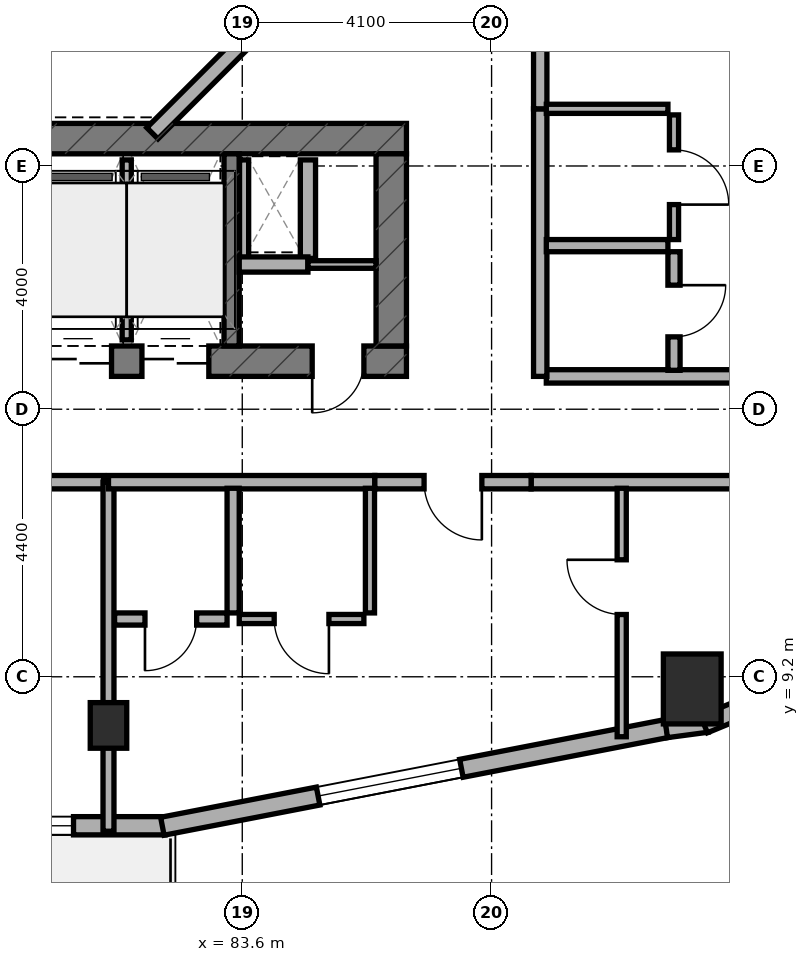
"""IFC4 building model, lengths in metres.
Left out: names, types, materials, properties, quantities, classifications, styles, units other than length and angle.
Written with IfcOpenShell. Run it as: python <this file> out.ifc"""

import sys

from ifc_helpers import new_model, si_unit, direction, frame, frame_2d, origin, origin_2d, place, context, subcontext, project, spatial, rectangle, extrude, element, fill, save


model = new_model("IFC4")
c1 = context("Model", 3, precision=1e-05, world=origin(), true_north=direction((0.0, 1.0)))
c2 = subcontext(c1, "Body", "Model", "MODEL_VIEW")
j1 = project(units=[si_unit("LENGTHUNIT", "METRE"), si_unit("PLANEANGLEUNIT", "RADIAN")], contexts=[c1])
p1 = place(None, origin())
s1 = spatial("IfcSite", under=j1, at=p1, CompositionType="ELEMENT")
p2 = place(p1, origin())
s2 = spatial("IfcBuilding", under=s1, at=p2, CompositionType="ELEMENT")
p3 = place(p2, frame((0.0, 0.0, 80.0)))
s3 = spatial("IfcBuildingStorey", under=s2, at=p3, CompositionType="ELEMENT", Elevation=80.0)
p4 = place(p3, frame((67.9, 14.39, 0.0), z_axis=(0.0, 0.0, 1.0), x_axis=(1.0, 0.0, 0.0)))
e1 = element("IfcWall", 1, at=p4, inside=s3, PredefinedType="SHEAR", context=c2, shape_type="SweptSolid", body=[
    extrude(rectangle(XDim=18.4, YDim=0.5, at=frame_2d((9.2, 0.0))), origin(), (0.0, 0.0, 1.0), 3.5),
])
p5 = place(p4, frame((9.25, 0.0, 0.0)))
e2 = element("IfcOpeningElement", 2, at=p5, cuts=e1, PredefinedType="OPENING", context=c2, shape_type="SweptSolid", body=[
    extrude(rectangle(XDim=1.2, YDim=2.15, at=frame_2d((0.6, 1.075))), frame((0.0, 0.26, 0.0), z_axis=(0.0, -1.0, 0.0), x_axis=(1.0, 0.0, 0.0)), (0.0, 0.0, 1.0), 0.52),
])
p6 = place(p4, frame((16.85, 0.0, 0.0)))
e3 = element("IfcOpeningElement", 3, at=p6, cuts=e1, PredefinedType="OPENING", context=c2, shape_type="SweptSolid", body=[
    extrude(rectangle(XDim=0.85, YDim=2.1, at=frame_2d((0.425, 1.05))), frame((0.0, 0.26, 0.0), z_axis=(0.0, -1.0, 0.0), x_axis=(1.0, 0.0, 0.0)), (0.0, 0.0, 1.0), 0.52),
])
p7 = place(p4, frame((12.45, 0.0, 0.0)))
e4 = element("IfcOpeningElement", 4, at=p7, cuts=e1, PredefinedType="OPENING", context=c2, shape_type="SweptSolid", body=[
    extrude(rectangle(XDim=1.1, YDim=2.15, at=frame_2d((0.55, 1.075))), frame((0.0, 0.26, 0.0), z_axis=(0.0, -1.0, 0.0), x_axis=(1.0, 0.0, 0.0)), (0.0, 0.0, 1.0), 0.52),
])
p8 = place(p4, frame((14.05, 0.0, 0.0)))
e5 = element("IfcOpeningElement", 5, at=p8, cuts=e1, PredefinedType="OPENING", context=c2, shape_type="SweptSolid", body=[
    extrude(rectangle(XDim=1.1, YDim=2.15, at=frame_2d((0.55, 1.075))), frame((0.0, 0.26, 0.0), z_axis=(0.0, -1.0, 0.0), x_axis=(1.0, 0.0, 0.0)), (0.0, 0.0, 1.0), 0.52),
])
p9 = place(p3, frame((67.9, 18.05, 0.0), z_axis=(0.0, 0.0, 1.0), x_axis=(1.0, 0.0, 0.0)))
e6 = element("IfcWall", 6, at=p9, inside=s3, PredefinedType="SHEAR", context=c2, shape_type="SweptSolid", body=[
    extrude(rectangle(XDim=18.4, YDim=0.5, at=frame_2d((9.2, 0.0))), origin(), (0.0, 0.0, 1.0), 3.5),
])
p10 = place(p3, frame((86.05, 14.64, 0.0), z_axis=(0.0, 0.0, 1.0), x_axis=(0.0, 1.0, 0.0)))
e7 = element("IfcWall", 7, at=p10, inside=s3, PredefinedType="SHEAR", context=c2, shape_type="SweptSolid", body=[
    extrude(rectangle(XDim=3.16, YDim=0.5, at=frame_2d((1.58, 0.0))), origin(), (0.0, 0.0, 1.0), 3.5),
])
p11 = place(p3, frame((83.425, 14.64, 0.0), z_axis=(0.0, 0.0, 1.0), x_axis=(0.0, 1.0, 0.0)))
e8 = element("IfcWall", 8, at=p11, inside=s3, PredefinedType="STANDARD", context=c2, shape_type="SweptSolid", body=[
    extrude(rectangle(XDim=3.16, YDim=0.25, at=frame_2d((1.58, 0.0))), origin(), (0.0, 0.0, 1.0), 3.25),
])
p12 = place(p3, frame((81.4, 8.4, 0.0), z_axis=(0.0, 0.0, 1.0), x_axis=(1.0, 0.0, 0.0)))
e9 = element("IfcColumn", 9, at=p12, inside=s3, PredefinedType="COLUMN", context=c2, shape_type="SweptSolid", body=[
    extrude(rectangle(XDim=0.6, YDim=0.75, at=origin_2d()), origin(), (0.0, 0.0, 1.0), 3.5),
])
p13 = place(p3, frame((91.0, 9.0, 0.0), z_axis=(0.0, 0.0, 1.0), x_axis=(1.0, 0.0, 0.0)))
e10 = element("IfcColumn", 10, at=p13, inside=s3, PredefinedType="COLUMN", context=c2, shape_type="SweptSolid", body=[
    extrude(rectangle(XDim=0.95, YDim=1.15, at=origin_2d()), origin(), (0.0, 0.0, 1.0), 3.5),
])
p14 = place(p3, frame((71.635, 6.75, 0.0), z_axis=(0.0, 0.0, 1.0), x_axis=(1.0, 0.0, 0.0)))
e11 = element("IfcWall", 11, at=p14, inside=s3, PredefinedType="STANDARD", context=c2, shape_type="SweptSolid", body=[
    extrude(rectangle(XDim=10.695, YDim=0.3, at=frame_2d((5.348, 0.0))), origin(), (0.0, 0.0, 1.0), 3.25),
])
p15 = place(p14, frame((4.665, 0.0, 0.0)))
e12 = element("IfcOpeningElement", 12, at=p15, cuts=e11, PredefinedType="OPENING", context=c2, shape_type="SweptSolid", body=[
    extrude(rectangle(XDim=1.4, YDim=2.15, at=frame_2d((0.7, 1.075))), frame((0.0, 0.16, 0.0), z_axis=(0.0, -1.0, 0.0), x_axis=(1.0, 0.0, 0.0)), (0.0, 0.0, 1.0), 0.32),
])
p16 = place(p14, frame((1.54, 0.0, 0.8)))
e13 = element("IfcOpeningElement", 13, at=p16, cuts=e11, PredefinedType="OPENING", context=c2, shape_type="SweptSolid", body=[
    extrude(rectangle(XDim=2.4, YDim=1.6, at=frame_2d((1.2, 0.8))), frame((0.0, 0.16, 0.0), z_axis=(0.0, -1.0, 0.0), x_axis=(1.0, 0.0, 0.0)), (0.0, 0.0, 1.0), 0.32),
])
p17 = place(p14, frame((6.79, 0.0, 0.8)))
e14 = element("IfcOpeningElement", 14, at=p17, cuts=e11, PredefinedType="OPENING", context=c2, shape_type="SweptSolid", body=[
    extrude(rectangle(XDim=2.4, YDim=1.6, at=frame_2d((1.2, 0.8))), frame((0.0, 0.16, 0.0), z_axis=(0.0, -1.0, 0.0), x_axis=(1.0, 0.0, 0.0)), (0.0, 0.0, 1.0), 0.32),
])
p18 = place(p3, frame((82.286, 6.742, 0.0), z_axis=(0.0, 0.0, 1.0), x_axis=(0.981734775858, 0.190254644808, 0.0)))
e15 = element("IfcWall", 15, at=p18, inside=s3, PredefinedType="STANDARD", context=c2, shape_type="SweptSolid", body=[
    extrude(rectangle(XDim=8.448, YDim=0.3, at=frame_2d((4.224, 0.0))), origin(), (0.0, 0.0, 1.0), 3.25),
])
p19 = place(p18, frame((2.609, 0.0, 0.8)))
e16 = element("IfcOpeningElement", 16, at=p19, cuts=e15, PredefinedType="OPENING", context=c2, shape_type="SweptSolid", body=[
    extrude(rectangle(XDim=2.4, YDim=1.6, at=frame_2d((1.2, 0.8))), frame((0.0, 0.16, 0.0), z_axis=(0.0, -1.0, 0.0), x_axis=(1.0, 0.0, 0.0)), (0.0, 0.0, 1.0), 0.32),
])
p20 = place(p3, frame((90.572, 8.348, 0.0), z_axis=(0.0, 0.0, 1.0), x_axis=(0.991293937098, 0.131667498923, 0.0)))
e17 = element("IfcWall", 17, at=p20, inside=s3, PredefinedType="STANDARD", context=c2, shape_type="SweptSolid", body=[
    extrude(rectangle(XDim=0.677, YDim=0.3, at=frame_2d((0.338, 0.0))), origin(), (0.0, 0.0, 1.0), 3.25),
])
p21 = place(p3, frame((91.193, 8.418, 0.0), z_axis=(0.0, 0.0, 1.0), x_axis=(0.924042561464, 0.382289608286, 0.0)))
e18 = element("IfcWall", 18, at=p21, inside=s3, PredefinedType="STANDARD", context=c2, shape_type="SweptSolid", body=[
    extrude(rectangle(XDim=0.694, YDim=0.3, at=frame_2d((0.347, 0.0))), origin(), (0.0, 0.0, 1.0), 3.25),
])
p22 = place(p3, frame((82.122, 18.138, 0.0), z_axis=(0.0, 0.0, 1.0), x_axis=(0.707106781187, 0.707106781187, 0.0)))
e19 = element("IfcWall", 19, at=p22, inside=s3, PredefinedType="STANDARD", context=c2, shape_type="SweptSolid", body=[
    extrude(rectangle(XDim=2.311, YDim=0.26, at=frame_2d((1.155, 0.0))), origin(), (0.0, 0.0, 1.0), 3.25),
])
p23 = place(p3, frame((83.63, 16.08, 0.0), z_axis=(0.0, 0.0, 1.0), x_axis=(0.0, 1.0, 0.0)))
e20 = element("IfcWall", 20, at=p23, inside=s3, PredefinedType="PARTITIONING", context=c2, shape_type="SweptSolid", body=[
    extrude(rectangle(XDim=1.62, YDim=0.15, at=frame_2d((0.81, 0.0))), origin(), (0.0, 0.0, 1.0), 2.825),
])
p24 = place(p3, frame((84.68, 16.08, 0.0), z_axis=(0.0, 0.0, 1.0), x_axis=(0.0, 1.0, 0.0)))
e21 = element("IfcWall", 21, at=p24, inside=s3, PredefinedType="SOLIDWALL", context=c2, shape_type="SweptSolid", body=[
    extrude(rectangle(XDim=1.62, YDim=0.25, at=frame_2d((0.81, 0.0))), origin(), (0.0, 0.0, 1.0), 3.22),
])
p25 = place(p3, frame((83.55, 15.98, 0.0), z_axis=(0.0, 0.0, 1.0), x_axis=(1.0, 0.0, 0.0)))
e22 = element("IfcWall", 22, at=p25, inside=s3, PredefinedType="SOLIDWALL", context=c2, shape_type="SweptSolid", body=[
    extrude(rectangle(XDim=1.13, YDim=0.25, at=frame_2d((0.565, 0.0))), origin(), (0.0, 0.0, 1.0), 3.22),
])
p26 = place(p3, frame((84.68, 15.98, 0.0), z_axis=(0.0, 0.0, 1.0), x_axis=(1.0, 0.0, 0.0)))
e23 = element("IfcWall", 23, at=p26, inside=s3, PredefinedType="PARTITIONING", context=c2, shape_type="SweptSolid", body=[
    extrude(rectangle(XDim=1.12, YDim=0.125, at=frame_2d((0.56, 0.0))), origin(), (0.0, 0.0, 1.0), 3.22),
])
p27 = place(p3, frame((81.7, 14.74, 0.0), z_axis=(0.0, 0.0, 1.0), x_axis=(0.0, 1.0, 0.0)))
e24 = element("IfcWall", 24, at=p27, inside=s3, PredefinedType="PARTITIONING", context=c2, shape_type="SweptSolid", body=[
    extrude(rectangle(XDim=2.96, YDim=0.15, at=frame_2d((1.48, 0.0))), origin(), (0.0, 0.0, 1.0), 3.22),
])
p28 = place(p3, frame((76.98, 12.4, 0.0), z_axis=(0.0, 0.0, 1.0), x_axis=(1.0, 0.0, 0.0)))
e25 = element("IfcWall", 25, at=p28, inside=s3, PredefinedType="SOLIDWALL", context=c2, shape_type="SweptSolid", body=[
    extrude(rectangle(XDim=4.34, YDim=0.22, at=frame_2d((2.17, 0.0))), origin(), (0.0, 0.0, 1.0), 2.825),
])
p29 = place(p28, frame((1.695, 0.0, 0.0)))
e26 = element("IfcOpeningElement", 26, at=p29, cuts=e25, PredefinedType="OPENING", context=c2, shape_type="SweptSolid", body=[
    extrude(rectangle(XDim=0.95, YDim=2.1, at=frame_2d((0.475, 1.05))), frame((0.0, 0.12, 0.0), z_axis=(0.0, -1.0, 0.0), x_axis=(1.0, 0.0, 0.0)), (0.0, 0.0, 1.0), 0.24),
])
p30 = place(p3, frame((81.4, 6.66, 0.0), z_axis=(0.0, 0.0, 1.0), x_axis=(0.0, 1.0, 0.0)))
e27 = element("IfcWall", 27, at=p30, inside=s3, PredefinedType="SOLIDWALL", context=c2, shape_type="SweptSolid", body=[
    extrude(rectangle(XDim=5.74, YDim=0.18, at=frame_2d((2.87, 0.0))), origin(), (0.0, 0.0, 1.0), 2.825),
])
p31 = place(p3, frame((81.4, 12.4, 0.0), z_axis=(0.0, 0.0, 1.0), x_axis=(1.0, 0.0, 0.0)))
e28 = element("IfcWall", 28, at=p31, inside=s3, PredefinedType="SOLIDWALL", context=c2, shape_type="SweptSolid", body=[
    extrude(rectangle(XDim=4.38, YDim=0.22, at=frame_2d((2.19, 0.0))), origin(), (0.0, 0.0, 1.0), 2.825),
])
p32 = place(p3, frame((88.35, 12.4, 0.0), z_axis=(0.0, 0.0, 1.0), x_axis=(1.0, 0.0, 0.0)))
e29 = element("IfcWall", 29, at=p32, inside=s3, PredefinedType="SOLIDWALL", context=c2, shape_type="SweptSolid", body=[
    extrude(rectangle(XDim=6.29, YDim=0.22, at=frame_2d((3.145, 0.0))), origin(), (0.0, 0.0, 1.0), 2.945),
])
p33 = place(p3, frame((85.78, 12.4, 0.0), z_axis=(0.0, 0.0, 1.0), x_axis=(1.0, 0.0, 0.0)))
e30 = element("IfcWall", 30, at=p33, inside=s3, PredefinedType="SOLIDWALL", context=c2, shape_type="SweptSolid", body=[
    extrude(rectangle(XDim=2.57, YDim=0.22, at=frame_2d((1.285, 0.0))), origin(), (0.0, 0.0, 1.0), 3.22),
])
p34 = place(p33, frame((0.81, 0.0, 0.0)))
e31 = element("IfcOpeningElement", 31, at=p34, cuts=e30, PredefinedType="OPENING", context=c2, shape_type="SweptSolid", body=[
    extrude(rectangle(XDim=0.95, YDim=2.1, at=frame_2d((0.475, 1.05))), frame((0.0, 0.12, 0.0), z_axis=(0.0, -1.0, 0.0), x_axis=(1.0, 0.0, 0.0)), (0.0, 0.0, 1.0), 0.24),
])
p35 = place(p3, frame((89.84, 8.214, 0.0), z_axis=(0.0, 0.0, 1.0), x_axis=(0.0, 1.0, 0.0)))
e32 = element("IfcWall", 32, at=p35, inside=s3, PredefinedType="PARTITIONING", context=c2, shape_type="SweptSolid", body=[
    extrude(rectangle(XDim=4.086, YDim=0.15, at=frame_2d((2.043, 0.0))), origin(), (0.0, 0.0, 1.0), 2.945),
])
p36 = place(p35, frame((2.01, 0.0, 0.0)))
e33 = element("IfcOpeningElement", 33, at=p36, cuts=e32, PredefinedType="OPENING", context=c2, shape_type="SweptSolid", body=[
    extrude(rectangle(XDim=0.9, YDim=2.1, at=frame_2d((0.45, 1.05))), frame((0.0, 0.085, 0.0), z_axis=(0.0, -1.0, 0.0), x_axis=(1.0, 0.0, 0.0)), (0.0, 0.0, 1.0), 0.17),
])
p37 = place(p3, frame((83.45, 10.25, 0.0), z_axis=(0.0, 0.0, 1.0), x_axis=(0.0, 1.0, 0.0)))
e34 = element("IfcWall", 34, at=p37, inside=s3, PredefinedType="PLUMBINGWALL", context=c2, shape_type="SweptSolid", body=[
    extrude(rectangle(XDim=2.05, YDim=0.2, at=frame_2d((1.025, 0.0))), origin(), (0.0, 0.0, 1.0), 3.22),
])
p38 = place(p3, frame((85.7, 10.25, 0.0), z_axis=(0.0, 0.0, 1.0), x_axis=(0.0, 1.0, 0.0)))
e35 = element("IfcWall", 35, at=p38, inside=s3, PredefinedType="PARTITIONING", context=c2, shape_type="SweptSolid", body=[
    extrude(rectangle(XDim=2.05, YDim=0.15, at=frame_2d((1.025, 0.0))), origin(), (0.0, 0.0, 1.0), 3.22),
])
p39 = place(p3, frame((81.5, 10.15, 0.0), z_axis=(0.0, 0.0, 1.0), x_axis=(1.0, 0.0, 0.0)))
e36 = element("IfcWall", 36, at=p39, inside=s3, PredefinedType="PLUMBINGWALL", context=c2, shape_type="SweptSolid", body=[
    extrude(rectangle(XDim=1.85, YDim=0.2, at=frame_2d((0.925, 0.0))), origin(), (0.0, 0.0, 1.0), 2.825),
])
p40 = place(p39, frame((0.5, 0.0, 0.0)))
e37 = element("IfcOpeningElement", 37, at=p40, cuts=e36, PredefinedType="OPENING", context=c2, shape_type="SweptSolid", body=[
    extrude(rectangle(XDim=0.85, YDim=2.1, at=frame_2d((0.425, 1.05))), frame((0.0, 0.11, 0.0), z_axis=(0.0, -1.0, 0.0), x_axis=(1.0, 0.0, 0.0)), (0.0, 0.0, 1.0), 0.22),
])
p41 = place(p3, frame((83.55, 10.15, 0.0), z_axis=(0.0, 0.0, 1.0), x_axis=(1.0, 0.0, 0.0)))
e38 = element("IfcWall", 38, at=p41, inside=s3, PredefinedType="PARTITIONING", context=c2, shape_type="SweptSolid", body=[
    extrude(rectangle(XDim=2.05, YDim=0.15, at=frame_2d((1.025, 0.0))), origin(), (0.0, 0.0, 1.0), 3.22),
])
p42 = place(p41, frame((0.575, 0.0, 0.0)))
e39 = element("IfcOpeningElement", 39, at=p42, cuts=e38, PredefinedType="OPENING", context=c2, shape_type="SweptSolid", body=[
    extrude(rectangle(XDim=0.9, YDim=2.1, at=frame_2d((0.45, 1.05))), frame((0.0, 0.085, 0.0), z_axis=(0.0, -1.0, 0.0), x_axis=(1.0, 0.0, 0.0)), (0.0, 0.0, 1.0), 0.17),
])
p43 = place(p3, frame((88.6, 14.14, 0.0), z_axis=(0.0, 0.0, 1.0), x_axis=(1.0, 0.0, 0.0)))
e40 = element("IfcWall", 40, at=p43, inside=s3, PredefinedType="SOLIDWALL", context=c2, shape_type="SweptSolid", body=[
    extrude(rectangle(XDim=5.88, YDim=0.22, at=frame_2d((2.94, 0.0))), origin(), (0.0, 0.0, 1.0), 2.945),
])
p44 = place(p3, frame((88.5, 14.14, 0.0), z_axis=(0.0, 0.0, 1.0), x_axis=(0.0, 1.0, 0.0)))
e41 = element("IfcWall", 41, at=p44, inside=s3, PredefinedType="SOLIDWALL", context=c2, shape_type="SweptSolid", body=[
    extrude(rectangle(XDim=4.4, YDim=0.22, at=frame_2d((2.2, 0.0))), origin(), (0.0, 0.0, 1.0), 3.22),
])
p45 = place(p3, frame((88.5, 18.54, 0.0), z_axis=(0.0, 0.0, 1.0), x_axis=(0.0, 1.0, 0.0)))
e42 = element("IfcWall", 42, at=p45, inside=s3, PredefinedType="SOLIDWALL", context=c2, shape_type="SweptSolid", body=[
    extrude(rectangle(XDim=3.46, YDim=0.22, at=frame_2d((1.73, 0.0))), origin(), (0.0, 0.0, 1.0), 2.825),
])
p46 = place(p45, frame((1.255, 0.0, 0.0)))
e43 = element("IfcOpeningElement", 43, at=p46, cuts=e42, PredefinedType="OPENING", context=c2, shape_type="SweptSolid", body=[
    extrude(rectangle(XDim=0.95, YDim=2.1, at=frame_2d((0.475, 1.05))), frame((0.0, 0.12, 0.0), z_axis=(0.0, -1.0, 0.0), x_axis=(1.0, 0.0, 0.0)), (0.0, 0.0, 1.0), 0.24),
])
p47 = place(p3, frame((88.6, 16.29, 0.0), z_axis=(0.0, 0.0, 1.0), x_axis=(1.0, 0.0, 0.0)))
e44 = element("IfcWall", 44, at=p47, inside=s3, PredefinedType="PLUMBINGWALL", context=c2, shape_type="SweptSolid", body=[
    extrude(rectangle(XDim=2.0, YDim=0.2, at=frame_2d((1.0, 0.0))), origin(), (0.0, 0.0, 1.0), 3.22),
])
p48 = place(p3, frame((88.6, 18.54, 0.0), z_axis=(0.0, 0.0, 1.0), x_axis=(1.0, 0.0, 0.0)))
e45 = element("IfcWall", 45, at=p48, inside=s3, PredefinedType="PARTITIONING", context=c2, shape_type="SweptSolid", body=[
    extrude(rectangle(XDim=2.0, YDim=0.15, at=frame_2d((1.0, 0.0))), origin(), (0.0, 0.0, 1.0), 3.22),
])
p49 = place(p3, frame((90.7, 14.24, 0.0), z_axis=(0.0, 0.0, 1.0), x_axis=(0.0, 1.0, 0.0)))
e46 = element("IfcWall", 46, at=p49, inside=s3, PredefinedType="PLUMBINGWALL", context=c2, shape_type="SweptSolid", body=[
    extrude(rectangle(XDim=1.95, YDim=0.2, at=frame_2d((0.975, 0.0))), origin(), (0.0, 0.0, 1.0), 3.22),
])
p50 = place(p49, frame((0.55, 0.0, 0.0)))
e47 = element("IfcOpeningElement", 47, at=p50, cuts=e46, PredefinedType="OPENING", context=c2, shape_type="SweptSolid", body=[
    extrude(rectangle(XDim=0.85, YDim=2.1, at=frame_2d((0.425, 1.05))), frame((0.0, 0.11, 0.0), z_axis=(0.0, -1.0, 0.0), x_axis=(1.0, 0.0, 0.0)), (0.0, 0.0, 1.0), 0.22),
])
p51 = place(p3, frame((90.7, 16.39, 0.0), z_axis=(0.0, 0.0, 1.0), x_axis=(0.0, 1.0, 0.0)))
e48 = element("IfcWall", 48, at=p51, inside=s3, PredefinedType="PARTITIONING", context=c2, shape_type="SweptSolid", body=[
    extrude(rectangle(XDim=2.05, YDim=0.15, at=frame_2d((1.025, 0.0))), origin(), (0.0, 0.0, 1.0), 3.22),
])
p52 = place(p51, frame((0.575, 0.0, 0.0)))
e49 = element("IfcOpeningElement", 49, at=p52, cuts=e48, PredefinedType="OPENING", context=c2, shape_type="SweptSolid", body=[
    extrude(rectangle(XDim=0.9, YDim=2.1, at=frame_2d((0.45, 1.05))), frame((0.0, 0.085, 0.0), z_axis=(0.0, -1.0, 0.0), x_axis=(1.0, 0.0, 0.0)), (0.0, 0.0, 1.0), 0.17),
])
p53 = place(p17, origin())
e50 = element("IfcWindow", 50, at=p53, inside=s3, PartitioningType="SINGLE_PANEL", PredefinedType="WINDOW", context=c2, shape_type="SweptSolid", body=[
    extrude(rectangle(XDim=2.4, YDim=1.6, at=frame_2d((1.2, 0.8))), frame((0.0, 0.03, 0.0), z_axis=(0.0, -1.0, 0.0), x_axis=(1.0, 0.0, 0.0)), (0.0, 0.0, 1.0), 0.06),
])
fill(e14, e50)
p54 = place(p19, origin())
e51 = element("IfcWindow", 51, at=p54, inside=s3, PartitioningType="SINGLE_PANEL", PredefinedType="WINDOW", context=c2, shape_type="SweptSolid", body=[
    extrude(rectangle(XDim=2.4, YDim=1.6, at=frame_2d((1.2, 0.8))), frame((0.0, 0.03, 0.0), z_axis=(0.0, -1.0, 0.0), x_axis=(1.0, 0.0, 0.0)), (0.0, 0.0, 1.0), 0.06),
])
fill(e16, e51)
p55 = place(p6, frame((0.85, 0.0, 0.0), z_axis=(0.0, 0.0, 1.0), x_axis=(-1.0, 0.0, 0.0)))
e52 = element("IfcDoor", 52, at=p55, inside=s3, OperationType="SINGLE_SWING_RIGHT", PredefinedType="DOOR", context=c2, shape_type="SweptSolid", body=[
    extrude(rectangle(XDim=0.85, YDim=2.1, at=frame_2d((0.425, 1.05))), frame((0.0, 0.025, 0.0), z_axis=(0.0, -1.0, 0.0), x_axis=(1.0, 0.0, 0.0)), (0.0, 0.0, 1.0), 0.05),
])
fill(e3, e52)
p56 = place(p7, frame((1.1, 0.0, 0.0), z_axis=(0.0, 0.0, 1.0), x_axis=(-1.0, 0.0, 0.0)))
e53 = element("IfcDoor", 53, at=p56, inside=s3, OperationType="DOUBLE_DOOR_SLIDING", PredefinedType="DOOR", context=c2, shape_type="SweptSolid", body=[
    extrude(rectangle(XDim=1.1, YDim=2.15, at=frame_2d((0.55, 1.075))), frame((0.0, 0.025, 0.0), z_axis=(0.0, -1.0, 0.0), x_axis=(1.0, 0.0, 0.0)), (0.0, 0.0, 1.0), 0.05),
])
fill(e4, e53)
p57 = place(p8, frame((1.1, 0.0, 0.0), z_axis=(0.0, 0.0, 1.0), x_axis=(-1.0, 0.0, 0.0)))
e54 = element("IfcDoor", 54, at=p57, inside=s3, OperationType="DOUBLE_DOOR_SLIDING", PredefinedType="DOOR", context=c2, shape_type="SweptSolid", body=[
    extrude(rectangle(XDim=1.1, YDim=2.15, at=frame_2d((0.55, 1.075))), frame((0.0, 0.025, 0.0), z_axis=(0.0, -1.0, 0.0), x_axis=(1.0, 0.0, 0.0)), (0.0, 0.0, 1.0), 0.05),
])
fill(e5, e54)
p58 = place(p34, frame((0.95, 0.0, 0.0), z_axis=(0.0, 0.0, 1.0), x_axis=(-1.0, 0.0, 0.0)))
e55 = element("IfcDoor", 55, at=p58, inside=s3, OperationType="SINGLE_SWING_LEFT", PredefinedType="DOOR", context=c2, shape_type="SweptSolid", body=[
    extrude(rectangle(XDim=0.95, YDim=2.1, at=frame_2d((0.475, 1.05))), frame((0.0, 0.025, 0.0), z_axis=(0.0, -1.0, 0.0), x_axis=(1.0, 0.0, 0.0)), (0.0, 0.0, 1.0), 0.05),
])
fill(e31, e55)
p59 = place(p36, origin())
e56 = element("IfcDoor", 56, at=p59, inside=s3, OperationType="SINGLE_SWING_RIGHT", PredefinedType="DOOR", context=c2, shape_type="SweptSolid", body=[
    extrude(rectangle(XDim=0.9, YDim=2.1, at=frame_2d((0.45, 1.05))), frame((0.0, 0.025, 0.0), z_axis=(0.0, -1.0, 0.0), x_axis=(1.0, 0.0, 0.0)), (0.0, 0.0, 1.0), 0.05),
])
fill(e33, e56)
p60 = place(p40, frame((0.85, 0.0, 0.0), z_axis=(0.0, 0.0, 1.0), x_axis=(-1.0, 0.0, 0.0)))
e57 = element("IfcDoor", 57, at=p60, inside=s3, OperationType="SINGLE_SWING_RIGHT", PredefinedType="DOOR", context=c2, shape_type="SweptSolid", body=[
    extrude(rectangle(XDim=0.85, YDim=2.1, at=frame_2d((0.425, 1.05))), frame((0.0, 0.025, 0.0), z_axis=(0.0, -1.0, 0.0), x_axis=(1.0, 0.0, 0.0)), (0.0, 0.0, 1.0), 0.05),
])
fill(e37, e57)
p61 = place(p42, frame((0.9, 0.0, 0.0), z_axis=(0.0, 0.0, 1.0), x_axis=(-1.0, 0.0, 0.0)))
e58 = element("IfcDoor", 58, at=p61, inside=s3, OperationType="SINGLE_SWING_LEFT", PredefinedType="DOOR", context=c2, shape_type="SweptSolid", body=[
    extrude(rectangle(XDim=0.9, YDim=2.1, at=frame_2d((0.45, 1.05))), frame((0.0, 0.025, 0.0), z_axis=(0.0, -1.0, 0.0), x_axis=(1.0, 0.0, 0.0)), (0.0, 0.0, 1.0), 0.05),
])
fill(e39, e58)
p62 = place(p50, frame((0.85, 0.0, 0.0), z_axis=(0.0, 0.0, 1.0), x_axis=(-1.0, 0.0, 0.0)))
e59 = element("IfcDoor", 59, at=p62, inside=s3, OperationType="SINGLE_SWING_LEFT", PredefinedType="DOOR", context=c2, shape_type="SweptSolid", body=[
    extrude(rectangle(XDim=0.85, YDim=2.1, at=frame_2d((0.425, 1.05))), frame((0.0, 0.025, 0.0), z_axis=(0.0, -1.0, 0.0), x_axis=(1.0, 0.0, 0.0)), (0.0, 0.0, 1.0), 0.05),
])
fill(e47, e59)
p63 = place(p52, frame((0.9, 0.0, 0.0), z_axis=(0.0, 0.0, 1.0), x_axis=(-1.0, 0.0, 0.0)))
e60 = element("IfcDoor", 60, at=p63, inside=s3, OperationType="SINGLE_SWING_RIGHT", PredefinedType="DOOR", context=c2, shape_type="SweptSolid", body=[
    extrude(rectangle(XDim=0.9, YDim=2.1, at=frame_2d((0.45, 1.05))), frame((0.0, 0.025, 0.0), z_axis=(0.0, -1.0, 0.0), x_axis=(1.0, 0.0, 0.0)), (0.0, 0.0, 1.0), 0.05),
])
fill(e49, e60)
save(model, sys.argv[1])
